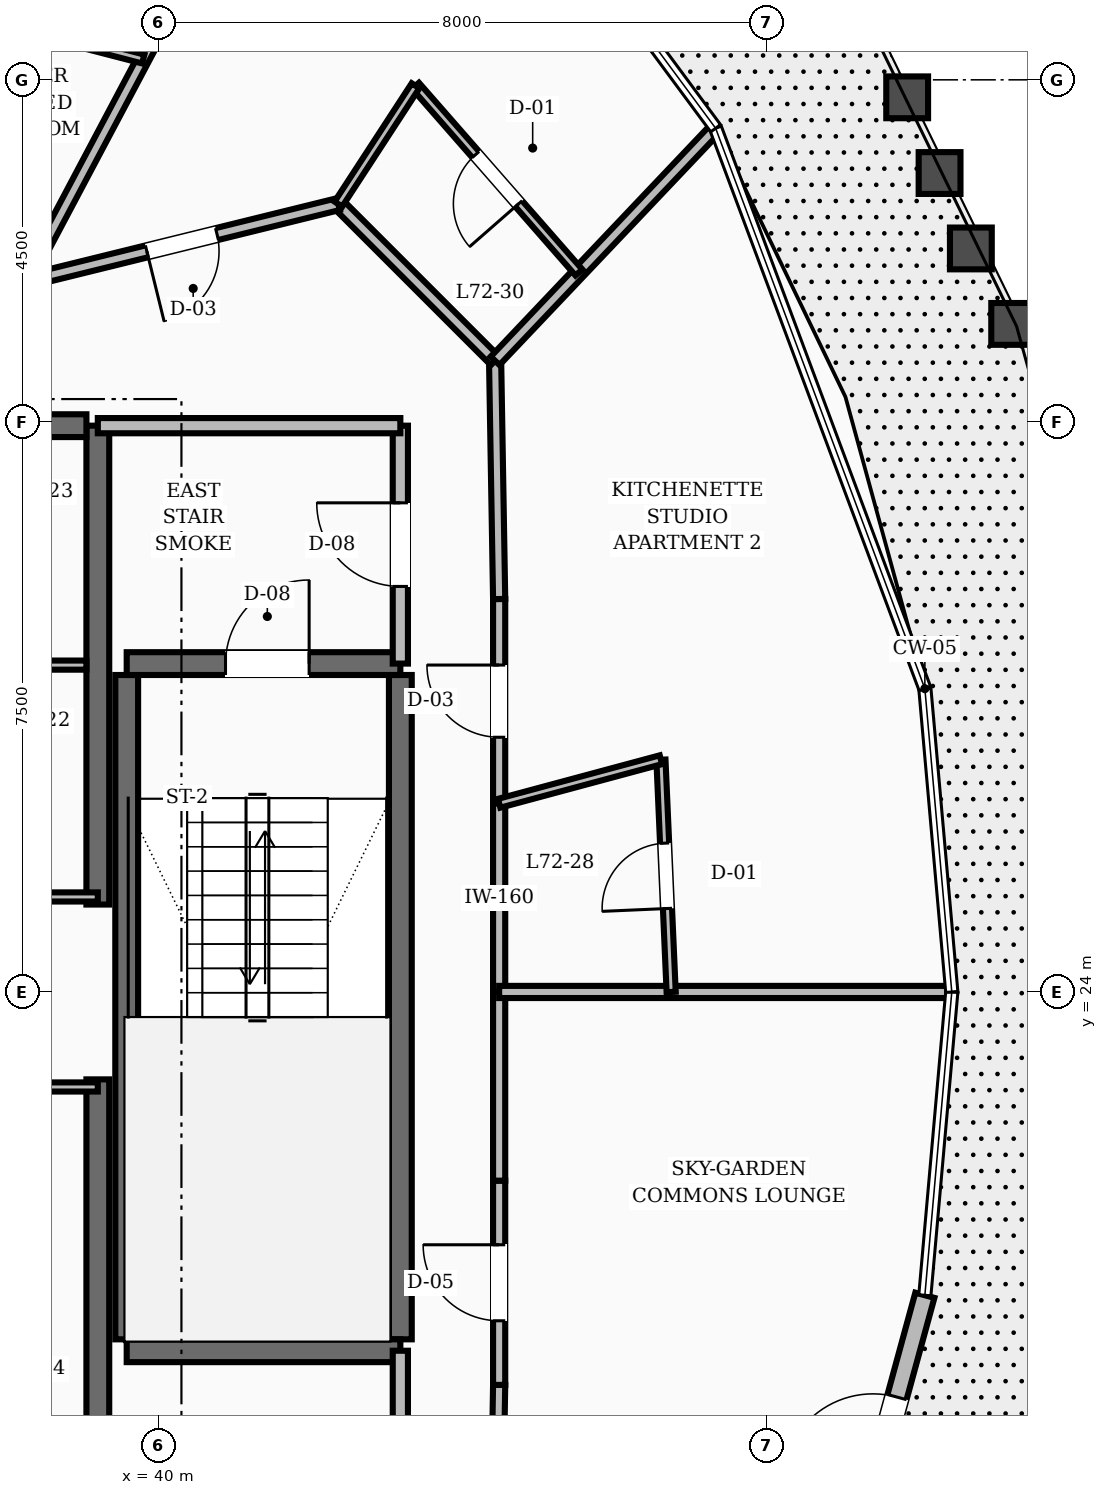
"""IFC4 building model, lengths in metres.
Left out: names, types, materials, properties, quantities, classifications, styles, units other than length and angle.
Written with IfcOpenShell. Run it as: python <this file> out.ifc"""

import sys

from ifc_helpers import new_model, si_unit, direction, frame, frame_2d, origin, place, context, subcontext, project, spatial, rectangle, extrude, element, fill, save


model = new_model("IFC4")
c1 = context("Model", 3, precision=1e-05, world=origin(), true_north=direction((0.0, 1.0)))
c2 = subcontext(c1, "Body", "Model", "MODEL_VIEW")
j1 = project(units=[si_unit("LENGTHUNIT", "METRE"), si_unit("PLANEANGLEUNIT", "RADIAN")], contexts=[c1])
p1 = place(None, origin())
s1 = spatial("IfcSite", under=j1, at=p1, CompositionType="ELEMENT")
p2 = place(p1, origin())
s2 = spatial("IfcBuilding", under=s1, at=p2, CompositionType="ELEMENT")
p3 = place(p2, frame((0.0, 0.0, 276.0)))
s3 = spatial("IfcBuildingStorey", under=s2, at=p3, CompositionType="ELEMENT", Elevation=276.0)
for number, where, z_axis, x_axis in (
    (1, (39.2, 16.55, 0.0), (0.0, 0.0, 1.0), (0.0, 1.0, 0.0)),
    (2, (39.2, 25.15, 0.0), (0.0, 0.0, 1.0), (0.0, 1.0, 0.0)),
):
    element("IfcWall", number, at=place(p3, frame(where, z_axis=z_axis, x_axis=x_axis)), inside=s3, PredefinedType="SHEAR", context=c2, shape_type="SweptSolid", body=[
        extrude(rectangle(XDim=6.3, YDim=0.3, at=frame_2d((3.15, 0.0))), origin(), (0.0, 0.0, 1.0), 3.6),
    ])
p4 = place(p3, frame((35.8, 31.45, 0.0), z_axis=(0.0, 0.0, 1.0), x_axis=(1.0, 0.0, 0.0)))
e3 = element("IfcWall", 3, at=p4, inside=s3, PredefinedType="SHEAR", context=c2, shape_type="SweptSolid", body=[
    extrude(rectangle(XDim=3.25, YDim=0.3, at=frame_2d((1.625, 0.0))), origin(), (0.0, 0.0, 1.0), 3.6),
])
p5 = place(p4, frame((0.3, 0.0, 0.0)))
e4 = element("IfcOpeningElement", 4, at=p5, cuts=e3, PredefinedType="OPENING", context=c2, shape_type="SweptSolid", body=[
    extrude(rectangle(XDim=1.1, YDim=2.1, at=frame_2d((0.55, 1.05))), frame((0.0, 0.16, 0.0), z_axis=(0.0, -1.0, 0.0), x_axis=(1.0, 0.0, 0.0)), (0.0, 0.0, 1.0), 0.32),
])
for number, where, z_axis, x_axis in (
    (5, (43.18, 19.43, 0.0), (0.0, 0.0, 1.0), (0.0, 1.0, 0.0)),
    (6, (39.58, 19.43, 0.0), (0.0, 0.0, 1.0), (0.0, 1.0, 0.0)),
):
    element("IfcWall", number, at=place(p3, frame(where, z_axis=z_axis, x_axis=x_axis)), inside=s3, PredefinedType="SHEAR", context=c2, shape_type="SweptSolid", body=[
        extrude(rectangle(XDim=8.74, YDim=0.3, at=frame_2d((4.37, 0.0))), origin(), (0.0, 0.0, 1.0), 3.6),
    ])
p6 = place(p3, frame((39.58, 19.28, 0.0), z_axis=(0.0, 0.0, 1.0), x_axis=(1.0, 0.0, 0.0)))
e7 = element("IfcWall", 7, at=p6, inside=s3, PredefinedType="SHEAR", context=c2, shape_type="SweptSolid", body=[
    extrude(rectangle(XDim=3.6, YDim=0.3, at=frame_2d((1.8, 0.0))), origin(), (0.0, 0.0, 1.0), 3.6),
])
p7 = place(p3, frame((39.58, 28.32, 0.0), z_axis=(0.0, 0.0, 1.0), x_axis=(1.0, 0.0, 0.0)))
e8 = element("IfcWall", 8, at=p7, inside=s3, PredefinedType="SHEAR", context=c2, shape_type="SweptSolid", body=[
    extrude(rectangle(XDim=3.6, YDim=0.3, at=frame_2d((1.8, 0.0))), origin(), (0.0, 0.0, 1.0), 3.6),
])
p8 = place(p7, frame((1.3, 0.0, 0.0)))
e9 = element("IfcOpeningElement", 9, at=p8, cuts=e8, PredefinedType="OPENING", context=c2, shape_type="SweptSolid", body=[
    extrude(rectangle(XDim=1.1, YDim=2.1, at=frame_2d((0.55, 1.05))), frame((0.0, 0.16, 0.0), z_axis=(0.0, -1.0, 0.0), x_axis=(1.0, 0.0, 0.0)), (0.0, 0.0, 1.0), 0.32),
])
p9 = place(p3, frame((49.031, 16.173, 0.0), z_axis=(0.0, 0.0, 1.0), x_axis=(0.263792473337, 0.964579458112, 0.0)))
e10 = element("IfcWall", 10, at=p9, inside=s3, PredefinedType="STANDARD", context=c2, shape_type="SweptSolid", body=[
    extrude(rectangle(XDim=3.978, YDim=0.26, at=frame_2d((1.989, 0.0))), origin(), (0.0, 0.0, 1.0), 2.88),
])
p10 = place(p9, frame((1.389, 0.0, 0.0)))
e11 = element("IfcOpeningElement", 11, at=p10, cuts=e10, PredefinedType="OPENING", context=c2, shape_type="SweptSolid", body=[
    extrude(rectangle(XDim=1.2, YDim=2.15, at=frame_2d((0.6, 1.075))), frame((0.0, 0.14, 0.0), z_axis=(0.0, -1.0, 0.0), x_axis=(1.0, 0.0, 0.0)), (0.0, 0.0, 1.0), 0.28),
])
p11 = place(p3, frame((43.18, 28.32, 0.0), z_axis=(0.0, 0.0, 1.0), x_axis=(0.0, 1.0, 0.0)))
e12 = element("IfcWall", 12, at=p11, inside=s3, PredefinedType="SOLIDWALL", context=c2, shape_type="SweptSolid", body=[
    extrude(rectangle(XDim=3.13, YDim=0.2, at=frame_2d((1.565, 0.0))), origin(), (0.0, 0.0, 1.0), 2.87),
])
p12 = place(p11, frame((1.015, 0.0, 0.0)))
e13 = element("IfcOpeningElement", 13, at=p12, cuts=e12, PredefinedType="OPENING", context=c2, shape_type="SweptSolid", body=[
    extrude(rectangle(XDim=1.1, YDim=2.1, at=frame_2d((0.55, 1.05))), frame((0.0, 0.11, 0.0), z_axis=(0.0, -1.0, 0.0), x_axis=(1.0, 0.0, 0.0)), (0.0, 0.0, 1.0), 0.22),
])
p13 = place(p3, frame((39.2, 31.45, 0.0), z_axis=(0.0, 0.0, 1.0), x_axis=(1.0, 0.0, 0.0)))
e14 = element("IfcWall", 14, at=p13, inside=s3, PredefinedType="SOLIDWALL", context=c2, shape_type="SweptSolid", body=[
    extrude(rectangle(XDim=3.98, YDim=0.2, at=frame_2d((1.99, 0.0))), origin(), (0.0, 0.0, 1.0), 2.87),
])
p14 = place(p3, frame((43.18, 16.55, 0.0), z_axis=(0.0, 0.0, 1.0), x_axis=(0.0, 1.0, 0.0)))
e15 = element("IfcWall", 15, at=p14, inside=s3, PredefinedType="SOLIDWALL", context=c2, shape_type="SweptSolid", body=[
    extrude(rectangle(XDim=2.73, YDim=0.2, at=frame_2d((1.365, 0.0))), origin(), (0.0, 0.0, 1.0), 2.87),
])
p15 = place(p14, frame((0.89, 0.0, 0.0)))
e16 = element("IfcOpeningElement", 16, at=p15, cuts=e15, PredefinedType="OPENING", context=c2, shape_type="SweptSolid", body=[
    extrude(rectangle(XDim=0.95, YDim=2.1, at=frame_2d((0.475, 1.05))), frame((0.0, 0.11, 0.0), z_axis=(0.0, -1.0, 0.0), x_axis=(1.0, 0.0, 0.0)), (0.0, 0.0, 1.0), 0.22),
])
for number, where, z_axis, x_axis in (
    (17, (37.4, 25.25, 0.0), (0.0, 0.0, 1.0), (1.0, 0.0, 0.0)),
    (18, (37.4, 22.75, 0.0), (0.0, 0.0, 1.0), (1.0, 0.0, 0.0)),
):
    element("IfcWall", number, at=place(p3, frame(where, z_axis=z_axis, x_axis=x_axis)), inside=s3, PredefinedType="PARTITIONING", context=c2, shape_type="SweptSolid", body=[
        extrude(rectangle(XDim=1.8, YDim=0.12, at=frame_2d((0.9, 0.0))), origin(), (0.0, 0.0, 1.0), 2.87),
    ])
p16 = place(p3, frame((37.4, 28.3, 0.0), z_axis=(0.0, 0.0, 1.0), x_axis=(1.0, 0.0, 0.0)))
e19 = element("IfcWall", 19, at=p16, inside=s3, PredefinedType="PARTITIONING", context=c2, shape_type="SweptSolid", body=[
    extrude(rectangle(XDim=1.65, YDim=0.12, at=frame_2d((0.825, 0.0))), origin(), (0.0, 0.0, 1.0), 2.87),
])
p17 = place(p3, frame((44.48, 24.0, 0.0), z_axis=(0.0, 0.0, 1.0), x_axis=(0.0, 1.0, 0.0)))
e20 = element("IfcWall", 20, at=p17, inside=s3, PredefinedType="SOLIDWALL", context=c2, shape_type="SweptSolid", body=[
    extrude(rectangle(XDim=2.482, YDim=0.16, at=frame_2d((1.241, 0.0))), origin(), (0.0, 0.0, 1.0), 2.87),
])
p18 = place(p3, frame((44.48, 26.482, 0.0), z_axis=(0.0, 0.0, 1.0), x_axis=(0.0, 1.0, 0.0)))
e21 = element("IfcWall", 21, at=p18, inside=s3, PredefinedType="SOLIDWALL", context=c2, shape_type="SweptSolid", body=[
    extrude(rectangle(XDim=2.687, YDim=0.16, at=frame_2d((1.344, 0.0))), origin(), (0.0, 0.0, 1.0), 2.87),
])
p19 = place(p18, frame((0.868, 0.0, 0.0)))
e22 = element("IfcOpeningElement", 22, at=p19, cuts=e21, PredefinedType="OPENING", context=c2, shape_type="SweptSolid", body=[
    extrude(rectangle(XDim=0.95, YDim=2.1, at=frame_2d((0.475, 1.05))), frame((0.0, 0.09, 0.0), z_axis=(0.0, -1.0, 0.0), x_axis=(1.0, 0.0, 0.0)), (0.0, 0.0, 1.0), 0.18),
])
p20 = place(p3, frame((44.48, 29.169, 0.0), z_axis=(0.0, 0.0, 1.0), x_axis=(-0.016981035134, 0.999855811828, 0.0)))
e23 = element("IfcWall", 23, at=p20, inside=s3, PredefinedType="SOLIDWALL", context=c2, shape_type="SweptSolid", body=[
    extrude(rectangle(XDim=3.134, YDim=0.16, at=frame_2d((1.567, 0.0))), origin(), (0.0, 0.0, 1.0), 2.87),
])
p21 = place(p3, frame((44.427, 32.303, 0.0), z_axis=(0.0, 0.0, 1.0), x_axis=(-0.707106781187, 0.707106781187, 0.0)))
e24 = element("IfcWall", 24, at=p21, inside=s3, PredefinedType="SOLIDWALL", context=c2, shape_type="SweptSolid", body=[
    extrude(rectangle(XDim=2.916, YDim=0.16, at=frame_2d((1.458, 0.0))), origin(), (0.0, 0.0, 1.0), 2.87),
])
p22 = place(p3, frame((42.365, 34.365, 0.0), z_axis=(0.0, 0.0, 1.0), x_axis=(-0.970939799552, -0.239323850978, 0.0)))
e25 = element("IfcWall", 25, at=p22, inside=s3, PredefinedType="SOLIDWALL", context=c2, shape_type="SweptSolid", body=[
    extrude(rectangle(XDim=4.241, YDim=0.16, at=frame_2d((2.12, 0.0))), origin(), (0.0, 0.0, 1.0), 2.87),
])
p23 = place(p22, frame((1.646, 0.0, 0.0)))
e26 = element("IfcOpeningElement", 26, at=p23, cuts=e25, PredefinedType="OPENING", context=c2, shape_type="SweptSolid", body=[
    extrude(rectangle(XDim=0.95, YDim=2.1, at=frame_2d((0.475, 1.05))), frame((0.0, 0.09, 0.0), z_axis=(0.0, -1.0, 0.0), x_axis=(1.0, 0.0, 0.0)), (0.0, 0.0, 1.0), 0.18),
])
p24 = place(p3, frame((44.427, 15.697, 0.0), z_axis=(0.0, 0.0, 1.0), x_axis=(0.016981035134, 0.999855811828, 0.0)))
e27 = element("IfcWall", 27, at=p24, inside=s3, PredefinedType="SOLIDWALL", context=c2, shape_type="SweptSolid", body=[
    extrude(rectangle(XDim=3.134, YDim=0.16, at=frame_2d((1.567, 0.0))), origin(), (0.0, 0.0, 1.0), 2.87),
])
p25 = place(p3, frame((44.48, 18.831, 0.0), z_axis=(0.0, 0.0, 1.0), x_axis=(0.0, 1.0, 0.0)))
e28 = element("IfcWall", 28, at=p25, inside=s3, PredefinedType="SOLIDWALL", context=c2, shape_type="SweptSolid", body=[
    extrude(rectangle(XDim=2.687, YDim=0.16, at=frame_2d((1.344, 0.0))), origin(), (0.0, 0.0, 1.0), 2.87),
])
p26 = place(p25, frame((0.844, 0.0, 0.0)))
e29 = element("IfcOpeningElement", 29, at=p26, cuts=e28, PredefinedType="OPENING", context=c2, shape_type="SweptSolid", body=[
    extrude(rectangle(XDim=1.0, YDim=2.1, at=frame_2d((0.5, 1.05))), frame((0.0, 0.09, 0.0), z_axis=(0.0, -1.0, 0.0), x_axis=(1.0, 0.0, 0.0)), (0.0, 0.0, 1.0), 0.18),
])
p27 = place(p3, frame((44.48, 21.518, 0.0), z_axis=(0.0, 0.0, 1.0), x_axis=(0.0, 1.0, 0.0)))
e30 = element("IfcWall", 30, at=p27, inside=s3, PredefinedType="SOLIDWALL", context=c2, shape_type="SweptSolid", body=[
    extrude(rectangle(XDim=2.482, YDim=0.16, at=frame_2d((1.241, 0.0))), origin(), (0.0, 0.0, 1.0), 2.87),
])
p28 = place(p3, frame((44.48, 24.0, 0.0), z_axis=(0.0, 0.0, 1.0), x_axis=(1.0, 0.0, 0.0)))
e31 = element("IfcWall", 31, at=p28, inside=s3, PredefinedType="SOLIDWALL", context=c2, shape_type="SweptSolid", body=[
    extrude(rectangle(XDim=5.905, YDim=0.16, at=frame_2d((2.953, 0.0))), origin(), (0.0, 0.0, 1.0), 2.87),
])
p29 = place(p3, frame((46.743, 24.0, 0.0), z_axis=(0.0, 0.0, 1.0), x_axis=(-0.043984558391, 0.999032211004, 0.0)))
e32 = element("IfcWall", 32, at=p29, inside=s3, PredefinedType="PARTITIONING", context=c2, shape_type="SweptSolid", body=[
    extrude(rectangle(XDim=3.058, YDim=0.12, at=frame_2d((1.529, 0.0))), origin(), (0.0, 0.0, 1.0), 2.87),
])
p30 = place(p29, frame((1.099, 0.0, 0.0)))
e33 = element("IfcOpeningElement", 33, at=p30, cuts=e32, PredefinedType="OPENING", context=c2, shape_type="SweptSolid", body=[
    extrude(rectangle(XDim=0.86, YDim=2.1, at=frame_2d((0.43, 1.05))), frame((0.0, 0.07, 0.0), z_axis=(0.0, -1.0, 0.0), x_axis=(1.0, 0.0, 0.0)), (0.0, 0.0, 1.0), 0.14),
])
p31 = place(p3, frame((44.48, 26.482, 0.0), z_axis=(0.0, 0.0, 1.0), x_axis=(0.965620036081, 0.259957584845, 0.0)))
e34 = element("IfcWall", 34, at=p31, inside=s3, PredefinedType="PARTITIONING", context=c2, shape_type="SweptSolid", body=[
    extrude(rectangle(XDim=2.204, YDim=0.12, at=frame_2d((1.102, 0.0))), origin(), (0.0, 0.0, 1.0), 2.87),
])
p32 = place(p3, frame((44.427, 32.303, 0.0), z_axis=(0.0, 0.0, 1.0), x_axis=(0.688077752734, 0.72563696584, 0.0)))
e35 = element("IfcWall", 35, at=p32, inside=s3, PredefinedType="SOLIDWALL", context=c2, shape_type="SweptSolid", body=[
    extrude(rectangle(XDim=4.167, YDim=0.16, at=frame_2d((2.083, 0.0))), origin(), (0.0, 0.0, 1.0), 2.87),
])
p33 = place(p3, frame((45.529, 33.466, 0.0), z_axis=(0.0, 0.0, 1.0), x_axis=(-0.658568155217, 0.752521086039, 0.0)))
e36 = element("IfcWall", 36, at=p33, inside=s3, PredefinedType="PARTITIONING", context=c2, shape_type="SweptSolid", body=[
    extrude(rectangle(XDim=3.264, YDim=0.12, at=frame_2d((1.632, 0.0))), origin(), (0.0, 0.0, 1.0), 2.87),
])
p34 = place(p33, frame((1.202, 0.0, 0.0)))
e37 = element("IfcOpeningElement", 37, at=p34, cuts=e36, PredefinedType="OPENING", context=c2, shape_type="SweptSolid", body=[
    extrude(rectangle(XDim=0.86, YDim=2.1, at=frame_2d((0.43, 1.05))), frame((0.0, 0.07, 0.0), z_axis=(0.0, -1.0, 0.0), x_axis=(1.0, 0.0, 0.0)), (0.0, 0.0, 1.0), 0.14),
])
p35 = place(p3, frame((42.365, 34.365, 0.0), z_axis=(0.0, 0.0, 1.0), x_axis=(0.546091451309, 0.837725567717, 0.0)))
e38 = element("IfcWall", 38, at=p35, inside=s3, PredefinedType="PARTITIONING", context=c2, shape_type="SweptSolid", body=[
    extrude(rectangle(XDim=1.858, YDim=0.12, at=frame_2d((0.929, 0.0))), origin(), (0.0, 0.0, 1.0), 2.87),
])
p36 = place(p3, frame((38.248, 33.35, 0.0), z_axis=(0.0, 0.0, 1.0), x_axis=(0.468387037798, 0.883523391214, 0.0)))
e39 = element("IfcWall", 39, at=p36, inside=s3, PredefinedType="SOLIDWALL", context=c2, shape_type="SweptSolid", body=[
    extrude(rectangle(XDim=9.142, YDim=0.16, at=frame_2d((4.571, 0.0))), origin(), (0.0, 0.0, 1.0), 2.87),
])
p37 = place(p3, frame((39.798, 36.274, 0.0), z_axis=(0.0, 0.0, 1.0), x_axis=(-0.968113270106, 0.250512866424, 0.0)))
e40 = element("IfcWall", 40, at=p37, inside=s3, PredefinedType="PARTITIONING", context=c2, shape_type="SweptSolid", body=[
    extrude(rectangle(XDim=2.791, YDim=0.12, at=frame_2d((1.396, 0.0))), origin(), (0.0, 0.0, 1.0), 2.87),
])
p38 = place(p10, origin())
e41 = element("IfcDoor", 41, at=p38, inside=s3, OperationType="SINGLE_SWING_LEFT", PredefinedType="DOOR", context=c2, shape_type="SweptSolid", body=[
    extrude(rectangle(XDim=1.2, YDim=2.15, at=frame_2d((0.6, 1.075))), frame((0.0, 0.025, 0.0), z_axis=(0.0, -1.0, 0.0), x_axis=(1.0, 0.0, 0.0)), (0.0, 0.0, 1.0), 0.05),
])
fill(e11, e41)
p39 = place(p8, origin())
e42 = element("IfcDoor", 42, at=p39, inside=s3, OperationType="SINGLE_SWING_RIGHT", PredefinedType="DOOR", context=c2, shape_type="SweptSolid", body=[
    extrude(rectangle(XDim=1.1, YDim=2.1, at=frame_2d((0.55, 1.05))), frame((0.0, 0.025, 0.0), z_axis=(0.0, -1.0, 0.0), x_axis=(1.0, 0.0, 0.0)), (0.0, 0.0, 1.0), 0.05),
])
fill(e9, e42)
p40 = place(p12, origin())
e43 = element("IfcDoor", 43, at=p40, inside=s3, OperationType="SINGLE_SWING_RIGHT", PredefinedType="DOOR", context=c2, shape_type="SweptSolid", body=[
    extrude(rectangle(XDim=1.1, YDim=2.1, at=frame_2d((0.55, 1.05))), frame((0.0, 0.025, 0.0), z_axis=(0.0, -1.0, 0.0), x_axis=(1.0, 0.0, 0.0)), (0.0, 0.0, 1.0), 0.05),
])
fill(e13, e43)
p41 = place(p26, origin())
e44 = element("IfcDoor", 44, at=p41, inside=s3, OperationType="SINGLE_SWING_RIGHT", PredefinedType="DOOR", context=c2, shape_type="SweptSolid", body=[
    extrude(rectangle(XDim=1.0, YDim=2.1, at=frame_2d((0.5, 1.05))), frame((0.0, 0.025, 0.0), z_axis=(0.0, -1.0, 0.0), x_axis=(1.0, 0.0, 0.0)), (0.0, 0.0, 1.0), 0.05),
])
fill(e29, e44)
p42 = place(p30, origin())
e45 = element("IfcDoor", 45, at=p42, inside=s3, OperationType="SINGLE_SWING_LEFT", PredefinedType="DOOR", context=c2, shape_type="SweptSolid", body=[
    extrude(rectangle(XDim=0.86, YDim=2.1, at=frame_2d((0.43, 1.05))), frame((0.0, 0.025, 0.0), z_axis=(0.0, -1.0, 0.0), x_axis=(1.0, 0.0, 0.0)), (0.0, 0.0, 1.0), 0.05),
])
fill(e33, e45)
p43 = place(p19, origin())
e46 = element("IfcDoor", 46, at=p43, inside=s3, OperationType="SINGLE_SWING_RIGHT", PredefinedType="DOOR", context=c2, shape_type="SweptSolid", body=[
    extrude(rectangle(XDim=0.95, YDim=2.1, at=frame_2d((0.475, 1.05))), frame((0.0, 0.025, 0.0), z_axis=(0.0, -1.0, 0.0), x_axis=(1.0, 0.0, 0.0)), (0.0, 0.0, 1.0), 0.05),
])
fill(e22, e46)
p44 = place(p34, origin())
e47 = element("IfcDoor", 47, at=p44, inside=s3, OperationType="SINGLE_SWING_LEFT", PredefinedType="DOOR", context=c2, shape_type="SweptSolid", body=[
    extrude(rectangle(XDim=0.86, YDim=2.1, at=frame_2d((0.43, 1.05))), frame((0.0, 0.025, 0.0), z_axis=(0.0, -1.0, 0.0), x_axis=(1.0, 0.0, 0.0)), (0.0, 0.0, 1.0), 0.05),
])
fill(e37, e47)
p45 = place(p23, origin())
e48 = element("IfcDoor", 48, at=p45, inside=s3, OperationType="SINGLE_SWING_RIGHT", PredefinedType="DOOR", context=c2, shape_type="SweptSolid", body=[
    extrude(rectangle(XDim=0.95, YDim=2.1, at=frame_2d((0.475, 1.05))), frame((0.0, 0.025, 0.0), z_axis=(0.0, -1.0, 0.0), x_axis=(1.0, 0.0, 0.0)), (0.0, 0.0, 1.0), 0.05),
])
fill(e26, e48)
save(model, sys.argv[1])
